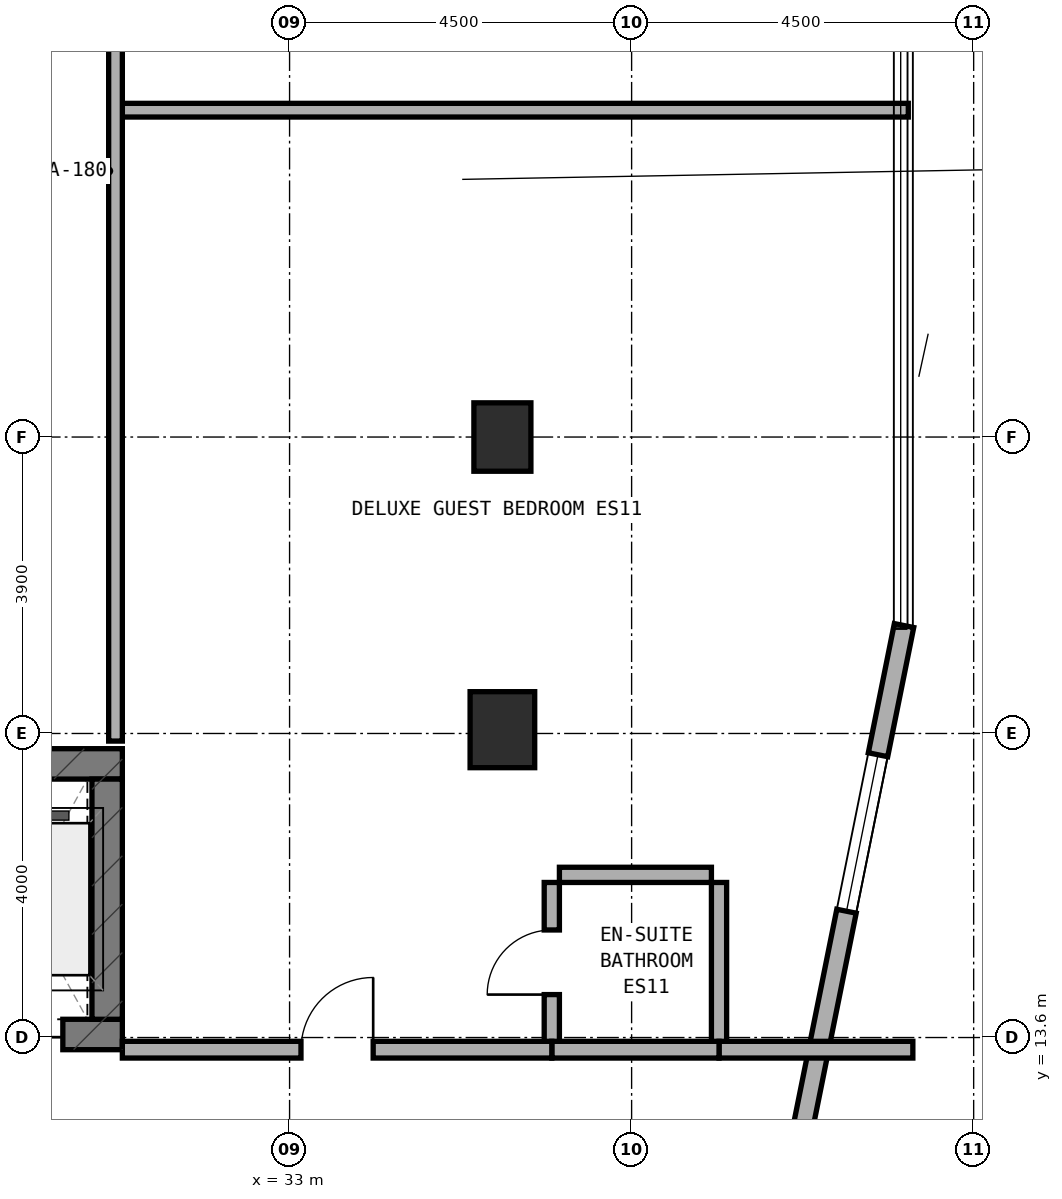
"""IFC4 building model, lengths in metres.
Left out: names, types, materials, properties, quantities, classifications, styles, units other than length and angle.
Written with IfcOpenShell. Run it as: python <this file> out.ifc"""

import sys

from ifc_helpers import new_model, si_unit, direction, frame, frame_2d, origin, origin_2d, place, context, subcontext, project, spatial, rectangle, extrude, element, fill, save


model = new_model("IFC4")
c1 = context("Model", 3, precision=1e-05, world=origin(), true_north=direction((0.0, 1.0)))
c2 = subcontext(c1, "Body", "Model", "MODEL_VIEW")
j1 = project(units=[si_unit("LENGTHUNIT", "METRE"), si_unit("PLANEANGLEUNIT", "RADIAN")], contexts=[c1])
p1 = place(None, origin())
s1 = spatial("IfcSite", under=j1, at=p1, CompositionType="ELEMENT")
p2 = place(p1, origin())
s2 = spatial("IfcBuilding", under=s1, at=p2, CompositionType="ELEMENT")
p3 = place(p2, frame((0.0, 0.0, 155.5)))
s3 = spatial("IfcBuildingStorey", under=s2, at=p3, CompositionType="ELEMENT", Elevation=155.5)
p4 = place(p3, frame((6.4, 13.64, 0.0), z_axis=(0.0, 0.0, 1.0), x_axis=(1.0, 0.0, 0.0)))
e1 = element("IfcWall", 1, at=p4, inside=s3, PredefinedType="SHEAR", context=c2, shape_type="SweptSolid", body=[
    extrude(rectangle(XDim=24.4, YDim=0.4, at=frame_2d((12.2, 0.0))), origin(), (0.0, 0.0, 1.0), 3.5),
])
p5 = place(p4, frame((9.15, 0.0, 0.0)))
e2 = element("IfcOpeningElement", 2, at=p5, cuts=e1, PredefinedType="OPENING", context=c2, shape_type="SweptSolid", body=[
    extrude(rectangle(XDim=1.2, YDim=2.15, at=frame_2d((0.6, 1.075))), frame((0.0, 0.21, 0.0), z_axis=(0.0, -1.0, 0.0), x_axis=(1.0, 0.0, 0.0)), (0.0, 0.0, 1.0), 0.42),
])
p6 = place(p4, frame((16.94, 0.0, 0.0)))
e3 = element("IfcOpeningElement", 3, at=p6, cuts=e1, PredefinedType="OPENING", context=c2, shape_type="SweptSolid", body=[
    extrude(rectangle(XDim=0.85, YDim=2.1, at=frame_2d((0.425, 1.05))), frame((0.0, 0.21, 0.0), z_axis=(0.0, -1.0, 0.0), x_axis=(1.0, 0.0, 0.0)), (0.0, 0.0, 1.0), 0.42),
])
p7 = place(p4, frame((18.783, 0.0, 0.0)))
e4 = element("IfcOpeningElement", 4, at=p7, cuts=e1, PredefinedType="OPENING", context=c2, shape_type="SweptSolid", body=[
    extrude(rectangle(XDim=1.1, YDim=2.15, at=frame_2d((0.55, 1.075))), frame((0.0, 0.21, 0.0), z_axis=(0.0, -1.0, 0.0), x_axis=(1.0, 0.0, 0.0)), (0.0, 0.0, 1.0), 0.42),
])
p8 = place(p4, frame((20.65, 0.0, 0.0)))
e5 = element("IfcOpeningElement", 5, at=p8, cuts=e1, PredefinedType="OPENING", context=c2, shape_type="SweptSolid", body=[
    extrude(rectangle(XDim=1.1, YDim=2.15, at=frame_2d((0.55, 1.075))), frame((0.0, 0.21, 0.0), z_axis=(0.0, -1.0, 0.0), x_axis=(1.0, 0.0, 0.0)), (0.0, 0.0, 1.0), 0.42),
])
p9 = place(p4, frame((22.517, 0.0, 0.0)))
e6 = element("IfcOpeningElement", 6, at=p9, cuts=e1, PredefinedType="OPENING", context=c2, shape_type="SweptSolid", body=[
    extrude(rectangle(XDim=1.1, YDim=2.15, at=frame_2d((0.55, 1.075))), frame((0.0, 0.21, 0.0), z_axis=(0.0, -1.0, 0.0), x_axis=(1.0, 0.0, 0.0)), (0.0, 0.0, 1.0), 0.42),
])
p10 = place(p3, frame((6.4, 17.2, 0.0), z_axis=(0.0, 0.0, 1.0), x_axis=(1.0, 0.0, 0.0)))
e7 = element("IfcWall", 7, at=p10, inside=s3, PredefinedType="SHEAR", context=c2, shape_type="SweptSolid", body=[
    extrude(rectangle(XDim=24.4, YDim=0.4, at=frame_2d((12.2, 0.0))), origin(), (0.0, 0.0, 1.0), 3.5),
])
p11 = place(p3, frame((30.6, 13.84, 0.0), z_axis=(0.0, 0.0, 1.0), x_axis=(0.0, 1.0, 0.0)))
e8 = element("IfcWall", 8, at=p11, inside=s3, PredefinedType="SHEAR", context=c2, shape_type="SweptSolid", body=[
    extrude(rectangle(XDim=3.16, YDim=0.4, at=frame_2d((1.58, 0.0))), origin(), (0.0, 0.0, 1.0), 3.5),
])
p12 = place(p3, frame((35.8, 21.5, 0.0), z_axis=(0.0, 0.0, 1.0), x_axis=(1.0, 0.0, 0.0)))
e9 = element("IfcColumn", 9, at=p12, inside=s3, PredefinedType="COLUMN", context=c2, shape_type="SweptSolid", body=[
    extrude(rectangle(XDim=0.75, YDim=0.9, at=origin_2d()), origin(), (0.0, 0.0, 1.0), 3.5),
])
p13 = place(p3, frame((35.8, 17.65, 0.0), z_axis=(0.0, 0.0, 1.0), x_axis=(1.0, 0.0, 0.0)))
e10 = element("IfcColumn", 10, at=p13, inside=s3, PredefinedType="COLUMN", context=c2, shape_type="SweptSolid", body=[
    extrude(rectangle(XDim=0.85, YDim=1.0, at=origin_2d()), origin(), (0.0, 0.0, 1.0), 3.5),
])
p14 = place(p3, frame((39.271, 10.018, 0.0), z_axis=(0.0, 0.0, 1.0), x_axis=(0.197435082048, 0.980315963543, 0.0)))
e11 = element("IfcWall", 11, at=p14, inside=s3, PredefinedType="STANDARD", context=c2, shape_type="SweptSolid", body=[
    extrude(rectangle(XDim=9.183, YDim=0.26, at=frame_2d((4.591, 0.0))), origin(), (0.0, 0.0, 1.0), 3.22),
])
p15 = place(p14, frame((5.349, 0.0, 0.85)))
e12 = element("IfcOpeningElement", 12, at=p15, cuts=e11, PredefinedType="OPENING", context=c2, shape_type="SweptSolid", body=[
    extrude(rectangle(XDim=2.1, YDim=1.5, at=frame_2d((1.05, 0.75))), frame((0.0, 0.14, 0.0), z_axis=(0.0, -1.0, 0.0), x_axis=(1.0, 0.0, 0.0)), (0.0, 0.0, 1.0), 0.28),
])
p16 = place(p3, frame((30.8, 25.8, 0.0), z_axis=(0.0, 0.0, 1.0), x_axis=(1.0, 0.0, 0.0)))
e13 = element("IfcWall", 13, at=p16, inside=s3, PredefinedType="SOLIDWALL", context=c2, shape_type="SweptSolid", body=[
    extrude(rectangle(XDim=10.34, YDim=0.18, at=frame_2d((5.17, 0.0))), origin(), (0.0, 0.0, 1.0), 2.835),
])
p17 = place(p3, frame((30.71, 17.5, 0.0), z_axis=(0.0, 0.0, 1.0), x_axis=(0.0, 1.0, 0.0)))
e14 = element("IfcWall", 14, at=p17, inside=s3, PredefinedType="SOLIDWALL", context=c2, shape_type="SweptSolid", body=[
    extrude(rectangle(XDim=15.0, YDim=0.18, at=frame_2d((7.5, 0.0))), origin(), (0.0, 0.0, 1.0), 2.795),
])
p18 = place(p3, frame((36.45, 13.54, 0.0), z_axis=(0.0, 0.0, 1.0), x_axis=(0.0, 1.0, 0.0)))
e15 = element("IfcWall", 15, at=p18, inside=s3, PredefinedType="PLUMBINGWALL", context=c2, shape_type="SweptSolid", body=[
    extrude(rectangle(XDim=2.1, YDim=0.2, at=frame_2d((1.05, 0.0))), origin(), (0.0, 0.0, 1.0), 3.22),
])
p19 = place(p18, frame((0.625, 0.0, 0.0)))
e16 = element("IfcOpeningElement", 16, at=p19, cuts=e15, PredefinedType="OPENING", context=c2, shape_type="SweptSolid", body=[
    extrude(rectangle(XDim=0.85, YDim=2.1, at=frame_2d((0.425, 1.05))), frame((0.0, 0.11, 0.0), z_axis=(0.0, -1.0, 0.0), x_axis=(1.0, 0.0, 0.0)), (0.0, 0.0, 1.0), 0.22),
])
p20 = place(p3, frame((36.55, 15.74, 0.0), z_axis=(0.0, 0.0, 1.0), x_axis=(1.0, 0.0, 0.0)))
e17 = element("IfcWall", 17, at=p20, inside=s3, PredefinedType="PLUMBINGWALL", context=c2, shape_type="SweptSolid", body=[
    extrude(rectangle(XDim=2.0, YDim=0.2, at=frame_2d((1.0, 0.0))), origin(), (0.0, 0.0, 1.0), 3.22),
])
p21 = place(p3, frame((38.65, 13.54, 0.0), z_axis=(0.0, 0.0, 1.0), x_axis=(0.0, 1.0, 0.0)))
e18 = element("IfcWall", 18, at=p21, inside=s3, PredefinedType="PLUMBINGWALL", context=c2, shape_type="SweptSolid", body=[
    extrude(rectangle(XDim=2.1, YDim=0.2, at=frame_2d((1.05, 0.0))), origin(), (0.0, 0.0, 1.0), 3.22),
])
p22 = place(p3, frame((38.65, 13.44, 0.0), z_axis=(0.0, 0.0, 1.0), x_axis=(1.0, 0.0, 0.0)))
e19 = element("IfcWall", 19, at=p22, inside=s3, PredefinedType="SOLIDWALL", context=c2, shape_type="SweptSolid", body=[
    extrude(rectangle(XDim=2.55, YDim=0.22, at=frame_2d((1.275, 0.0))), origin(), (0.0, 0.0, 1.0), 3.22),
])
p23 = place(p3, frame((36.45, 13.44, 0.0), z_axis=(0.0, 0.0, 1.0), x_axis=(1.0, 0.0, 0.0)))
e20 = element("IfcWall", 20, at=p23, inside=s3, PredefinedType="SOLIDWALL", context=c2, shape_type="SweptSolid", body=[
    extrude(rectangle(XDim=2.2, YDim=0.22, at=frame_2d((1.1, 0.0))), origin(), (0.0, 0.0, 1.0), 3.22),
])
p24 = place(p3, frame((30.8, 13.44, 0.0), z_axis=(0.0, 0.0, 1.0), x_axis=(1.0, 0.0, 0.0)))
e21 = element("IfcWall", 21, at=p24, inside=s3, PredefinedType="SOLIDWALL", context=c2, shape_type="SweptSolid", body=[
    extrude(rectangle(XDim=5.65, YDim=0.22, at=frame_2d((2.825, 0.0))), origin(), (0.0, 0.0, 1.0), 2.795),
])
p25 = place(p24, frame((2.35, 0.0, 0.0)))
e22 = element("IfcOpeningElement", 22, at=p25, cuts=e21, PredefinedType="OPENING", context=c2, shape_type="SweptSolid", body=[
    extrude(rectangle(XDim=0.95, YDim=2.1, at=frame_2d((0.475, 1.05))), frame((0.0, 0.12, 0.0), z_axis=(0.0, -1.0, 0.0), x_axis=(1.0, 0.0, 0.0)), (0.0, 0.0, 1.0), 0.24),
])
p26 = place(p15, origin())
e23 = element("IfcWindow", 23, at=p26, inside=s3, PartitioningType="SINGLE_PANEL", PredefinedType="WINDOW", context=c2, shape_type="SweptSolid", body=[
    extrude(rectangle(XDim=2.1, YDim=1.5, at=frame_2d((1.05, 0.75))), frame((0.0, 0.03, 0.0), z_axis=(0.0, -1.0, 0.0), x_axis=(1.0, 0.0, 0.0)), (0.0, 0.0, 1.0), 0.06),
])
fill(e12, e23)
p27 = place(p9, frame((1.1, 0.0, 0.0), z_axis=(0.0, 0.0, 1.0), x_axis=(-1.0, 0.0, 0.0)))
e24 = element("IfcDoor", 24, at=p27, inside=s3, OperationType="DOUBLE_DOOR_SLIDING", PredefinedType="DOOR", context=c2, shape_type="SweptSolid", body=[
    extrude(rectangle(XDim=1.1, YDim=2.15, at=frame_2d((0.55, 1.075))), frame((0.0, 0.025, 0.0), z_axis=(0.0, -1.0, 0.0), x_axis=(1.0, 0.0, 0.0)), (0.0, 0.0, 1.0), 0.05),
])
fill(e6, e24)
p28 = place(p19, origin())
e25 = element("IfcDoor", 25, at=p28, inside=s3, OperationType="SINGLE_SWING_LEFT", PredefinedType="DOOR", context=c2, shape_type="SweptSolid", body=[
    extrude(rectangle(XDim=0.85, YDim=2.1, at=frame_2d((0.425, 1.05))), frame((0.0, 0.025, 0.0), z_axis=(0.0, -1.0, 0.0), x_axis=(1.0, 0.0, 0.0)), (0.0, 0.0, 1.0), 0.05),
])
fill(e16, e25)
p29 = place(p25, origin())
e26 = element("IfcDoor", 26, at=p29, inside=s3, OperationType="SINGLE_SWING_RIGHT", PredefinedType="DOOR", context=c2, shape_type="SweptSolid", body=[
    extrude(rectangle(XDim=0.95, YDim=2.1, at=frame_2d((0.475, 1.05))), frame((0.0, 0.025, 0.0), z_axis=(0.0, -1.0, 0.0), x_axis=(1.0, 0.0, 0.0)), (0.0, 0.0, 1.0), 0.05),
])
fill(e22, e26)
save(model, sys.argv[1])
